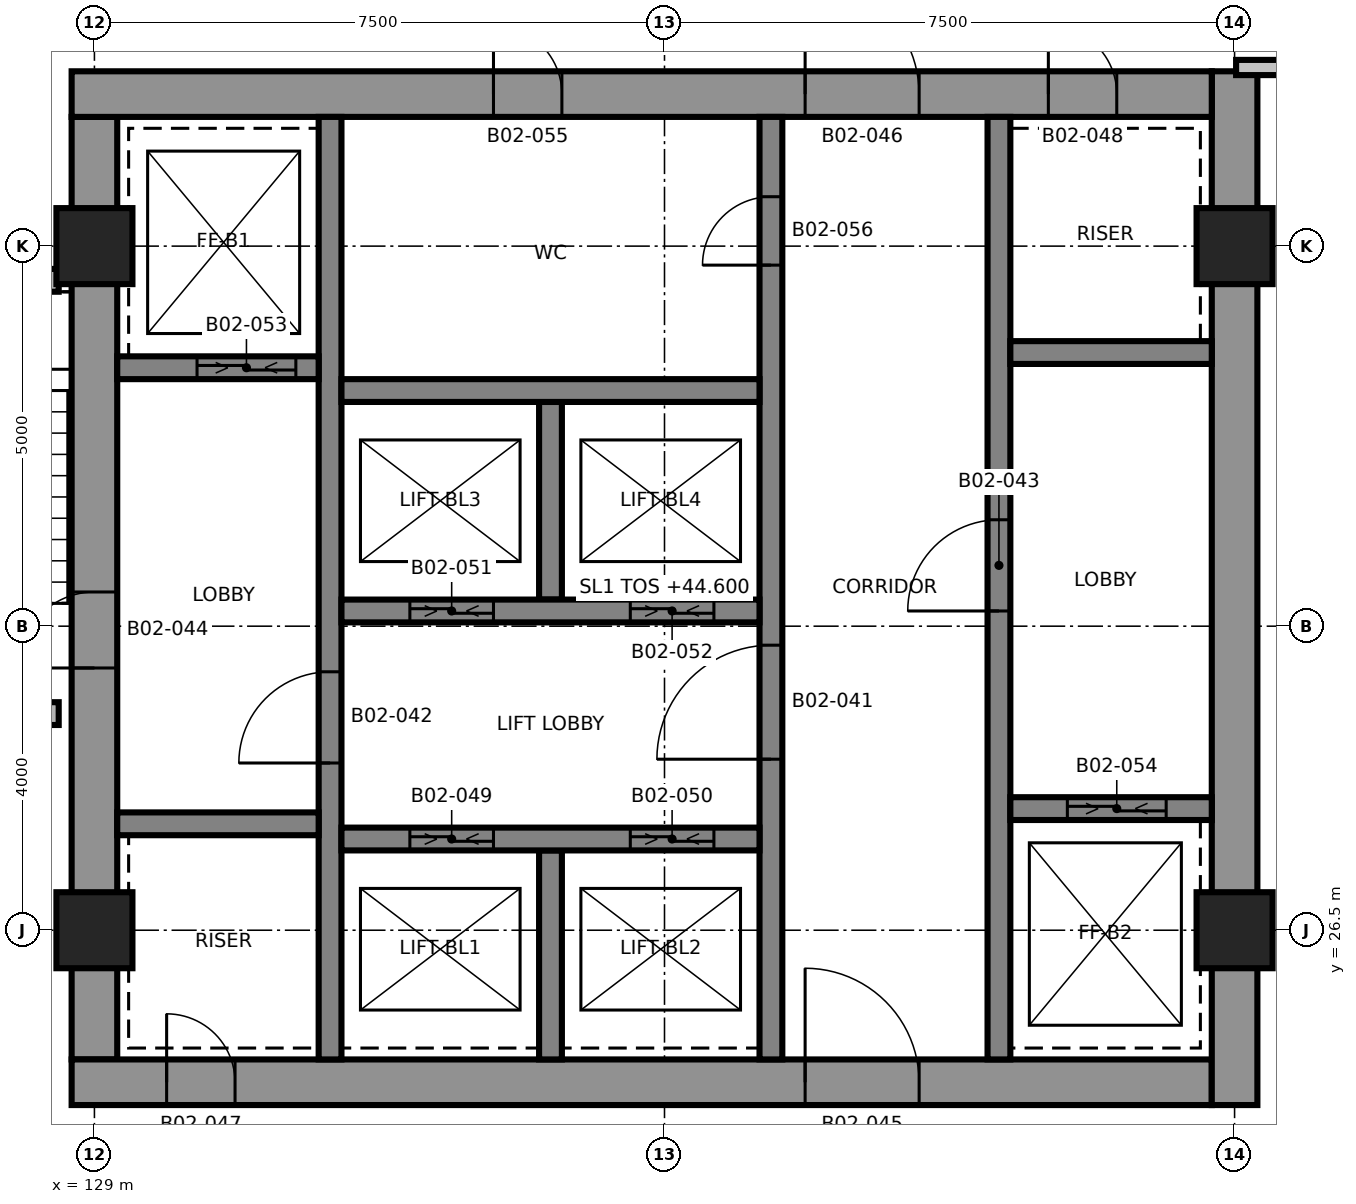
"""IFC4 building model, lengths in metres.
Left out: names, types, materials, properties, quantities, classifications, styles, units other than length and angle.
Written with IfcOpenShell. Run it as: python <this file> out.ifc"""

import sys

from ifc_helpers import new_model, si_unit, direction, frame, frame_2d, origin, origin_2d, place, context, subcontext, project, spatial, rectangle, extrude, element, fill, save


model = new_model("IFC4")
c1 = context("Model", 3, precision=1e-05, world=origin(), true_north=direction((0.0, 1.0)))
c2 = subcontext(c1, "Body", "Model", "MODEL_VIEW")
j1 = project(units=[si_unit("LENGTHUNIT", "METRE"), si_unit("PLANEANGLEUNIT", "RADIAN")], contexts=[c1])
p1 = place(None, origin())
s1 = spatial("IfcSite", under=j1, at=p1, CompositionType="ELEMENT")
p2 = place(p1, origin())
s2 = spatial("IfcBuilding", under=s1, at=p2, CompositionType="ELEMENT")
p3 = place(p2, frame((0.0, 0.0, 44.6)))
s3 = spatial("IfcBuildingStorey", under=s2, at=p3, CompositionType="ELEMENT", Elevation=44.6)
p4 = place(p3, frame((129.0, 24.8, 0.0), z_axis=(0.0, 0.0, 1.0), x_axis=(0.0, 1.0, 0.0)))
e1 = element("IfcWall", 1, at=p4, inside=s3, PredefinedType="SHEAR", context=c2, shape_type="SweptSolid", body=[
    extrude(rectangle(XDim=12.4, YDim=0.6, at=frame_2d((6.2, 0.0))), origin(), (0.0, 0.0, 1.0), 3.7),
])
p5 = place(p4, frame((5.15, 0.0, 0.0)))
e2 = element("IfcOpeningElement", 2, at=p5, cuts=e1, PredefinedType="OPENING", context=c2, shape_type="SweptSolid", body=[
    extrude(rectangle(XDim=1.0, YDim=2.1, at=frame_2d((0.5, 1.05))), frame((0.0, 0.31, 0.0), z_axis=(0.0, -1.0, 0.0), x_axis=(1.0, 0.0, 0.0)), (0.0, 0.0, 1.0), 0.62),
])
p6 = place(p3, frame((128.7, 24.5, 0.0), z_axis=(0.0, 0.0, 1.0), x_axis=(1.0, 0.0, 0.0)))
e3 = element("IfcWall", 3, at=p6, inside=s3, PredefinedType="SHEAR", context=c2, shape_type="SweptSolid", body=[
    extrude(rectangle(XDim=15.0, YDim=0.6, at=frame_2d((7.5, 0.0))), origin(), (0.0, 0.0, 1.0), 3.7),
])
p7 = place(p6, frame((9.65, 0.0, 0.0)))
e4 = element("IfcOpeningElement", 4, at=p7, cuts=e3, PredefinedType="OPENING", context=c2, shape_type="SweptSolid", body=[
    extrude(rectangle(XDim=1.5, YDim=2.1, at=frame_2d((0.75, 1.05))), frame((0.0, 0.31, 0.0), z_axis=(0.0, -1.0, 0.0), x_axis=(1.0, 0.0, 0.0)), (0.0, 0.0, 1.0), 0.62),
])
p8 = place(p6, frame((1.25, 0.0, 0.0)))
e5 = element("IfcOpeningElement", 5, at=p8, cuts=e3, PredefinedType="OPENING", context=c2, shape_type="SweptSolid", body=[
    extrude(rectangle(XDim=0.9, YDim=2.1, at=frame_2d((0.45, 1.05))), frame((0.0, 0.31, 0.0), z_axis=(0.0, -1.0, 0.0), x_axis=(1.0, 0.0, 0.0)), (0.0, 0.0, 1.0), 0.62),
])
p9 = place(p3, frame((144.0, 24.2, 0.0), z_axis=(0.0, 0.0, 1.0), x_axis=(0.0, 1.0, 0.0)))
e6 = element("IfcWall", 6, at=p9, inside=s3, PredefinedType="SHEAR", context=c2, shape_type="SweptSolid", body=[
    extrude(rectangle(XDim=13.6, YDim=0.6, at=frame_2d((6.8, 0.0))), origin(), (0.0, 0.0, 1.0), 3.7),
])
p10 = place(p3, frame((128.7, 37.5, 0.0), z_axis=(0.0, 0.0, 1.0), x_axis=(1.0, 0.0, 0.0)))
e7 = element("IfcWall", 7, at=p10, inside=s3, PredefinedType="SHEAR", context=c2, shape_type="SweptSolid", body=[
    extrude(rectangle(XDim=15.0, YDim=0.6, at=frame_2d((7.5, 0.0))), origin(), (0.0, 0.0, 1.0), 3.7),
])
p11 = place(p10, frame((9.65, 0.0, 0.0)))
e8 = element("IfcOpeningElement", 8, at=p11, cuts=e7, PredefinedType="OPENING", context=c2, shape_type="SweptSolid", body=[
    extrude(rectangle(XDim=1.5, YDim=2.1, at=frame_2d((0.75, 1.05))), frame((0.0, 0.31, 0.0), z_axis=(0.0, -1.0, 0.0), x_axis=(1.0, 0.0, 0.0)), (0.0, 0.0, 1.0), 0.62),
])
p12 = place(p10, frame((12.85, 0.0, 0.0)))
e9 = element("IfcOpeningElement", 9, at=p12, cuts=e7, PredefinedType="OPENING", context=c2, shape_type="SweptSolid", body=[
    extrude(rectangle(XDim=0.9, YDim=2.1, at=frame_2d((0.45, 1.05))), frame((0.0, 0.31, 0.0), z_axis=(0.0, -1.0, 0.0), x_axis=(1.0, 0.0, 0.0)), (0.0, 0.0, 1.0), 0.62),
])
p13 = place(p10, frame((5.55, 0.0, 0.0)))
e10 = element("IfcOpeningElement", 10, at=p13, cuts=e7, PredefinedType="OPENING", context=c2, shape_type="SweptSolid", body=[
    extrude(rectangle(XDim=0.9, YDim=2.1, at=frame_2d((0.45, 1.05))), frame((0.0, 0.31, 0.0), z_axis=(0.0, -1.0, 0.0), x_axis=(1.0, 0.0, 0.0)), (0.0, 0.0, 1.0), 0.62),
])
p14 = place(p3, frame((132.1, 24.8, 0.0), z_axis=(0.0, 0.0, 1.0), x_axis=(0.0, 1.0, 0.0)))
e11 = element("IfcWall", 11, at=p14, inside=s3, PredefinedType="SHEAR", context=c2, shape_type="SweptSolid", body=[
    extrude(rectangle(XDim=12.4, YDim=0.3, at=frame_2d((6.2, 0.0))), origin(), (0.0, 0.0, 1.0), 3.7),
])
p15 = place(p14, frame((3.9, 0.0, 0.0)))
e12 = element("IfcOpeningElement", 12, at=p15, cuts=e11, PredefinedType="OPENING", context=c2, shape_type="SweptSolid", body=[
    extrude(rectangle(XDim=1.2, YDim=2.1, at=frame_2d((0.6, 1.05))), frame((0.0, 0.16, 0.0), z_axis=(0.0, -1.0, 0.0), x_axis=(1.0, 0.0, 0.0)), (0.0, 0.0, 1.0), 0.32),
])
p16 = place(p3, frame((137.9, 24.8, 0.0), z_axis=(0.0, 0.0, 1.0), x_axis=(0.0, 1.0, 0.0)))
e13 = element("IfcWall", 13, at=p16, inside=s3, PredefinedType="SHEAR", context=c2, shape_type="SweptSolid", body=[
    extrude(rectangle(XDim=12.4, YDim=0.3, at=frame_2d((6.2, 0.0))), origin(), (0.0, 0.0, 1.0), 3.7),
])
p17 = place(p16, frame((3.95, 0.0, 0.0)))
e14 = element("IfcOpeningElement", 14, at=p17, cuts=e13, PredefinedType="OPENING", context=c2, shape_type="SweptSolid", body=[
    extrude(rectangle(XDim=1.5, YDim=2.1, at=frame_2d((0.75, 1.05))), frame((0.0, 0.16, 0.0), z_axis=(0.0, -1.0, 0.0), x_axis=(1.0, 0.0, 0.0)), (0.0, 0.0, 1.0), 0.32),
])
p18 = place(p16, frame((10.45, 0.0, 0.0)))
e15 = element("IfcOpeningElement", 15, at=p18, cuts=e13, PredefinedType="OPENING", context=c2, shape_type="SweptSolid", body=[
    extrude(rectangle(XDim=0.9, YDim=2.1, at=frame_2d((0.45, 1.05))), frame((0.0, 0.16, 0.0), z_axis=(0.0, -1.0, 0.0), x_axis=(1.0, 0.0, 0.0)), (0.0, 0.0, 1.0), 0.32),
])
p19 = place(p3, frame((140.9, 24.8, 0.0), z_axis=(0.0, 0.0, 1.0), x_axis=(0.0, 1.0, 0.0)))
e16 = element("IfcWall", 16, at=p19, inside=s3, PredefinedType="SHEAR", context=c2, shape_type="SweptSolid", body=[
    extrude(rectangle(XDim=12.4, YDim=0.3, at=frame_2d((6.2, 0.0))), origin(), (0.0, 0.0, 1.0), 3.7),
])
p20 = place(p19, frame((5.9, 0.0, 0.0)))
e17 = element("IfcOpeningElement", 17, at=p20, cuts=e16, PredefinedType="OPENING", context=c2, shape_type="SweptSolid", body=[
    extrude(rectangle(XDim=1.2, YDim=2.1, at=frame_2d((0.6, 1.05))), frame((0.0, 0.16, 0.0), z_axis=(0.0, -1.0, 0.0), x_axis=(1.0, 0.0, 0.0)), (0.0, 0.0, 1.0), 0.32),
])
p21 = place(p3, frame((135.0, 24.8, 0.0), z_axis=(0.0, 0.0, 1.0), x_axis=(0.0, 1.0, 0.0)))
e18 = element("IfcWall", 18, at=p21, inside=s3, PredefinedType="SHEAR", context=c2, shape_type="SweptSolid", body=[
    extrude(rectangle(XDim=2.75, YDim=0.3, at=frame_2d((1.375, 0.0))), origin(), (0.0, 0.0, 1.0), 3.7),
])
p22 = place(p3, frame((135.0, 30.85, 0.0), z_axis=(0.0, 0.0, 1.0), x_axis=(0.0, 1.0, 0.0)))
e19 = element("IfcWall", 19, at=p22, inside=s3, PredefinedType="SHEAR", context=c2, shape_type="SweptSolid", body=[
    extrude(rectangle(XDim=2.6, YDim=0.3, at=frame_2d((1.3, 0.0))), origin(), (0.0, 0.0, 1.0), 3.7),
])
p23 = place(p3, frame((132.25, 27.7, 0.0), z_axis=(0.0, 0.0, 1.0), x_axis=(1.0, 0.0, 0.0)))
e20 = element("IfcWall", 20, at=p23, inside=s3, PredefinedType="SHEAR", context=c2, shape_type="SweptSolid", body=[
    extrude(rectangle(XDim=5.5, YDim=0.3, at=frame_2d((2.75, 0.0))), origin(), (0.0, 0.0, 1.0), 3.7),
])
p24 = place(p23, frame((0.9, 0.0, 0.0)))
e21 = element("IfcOpeningElement", 21, at=p24, cuts=e20, PredefinedType="OPENING", context=c2, shape_type="SweptSolid", body=[
    extrude(rectangle(XDim=1.1, YDim=2.4, at=frame_2d((0.55, 1.2))), frame((0.0, 0.16, 0.0), z_axis=(0.0, -1.0, 0.0), x_axis=(1.0, 0.0, 0.0)), (0.0, 0.0, 1.0), 0.32),
])
p25 = place(p23, frame((3.8, 0.0, 0.0)))
e22 = element("IfcOpeningElement", 22, at=p25, cuts=e20, PredefinedType="OPENING", context=c2, shape_type="SweptSolid", body=[
    extrude(rectangle(XDim=1.1, YDim=2.4, at=frame_2d((0.55, 1.2))), frame((0.0, 0.16, 0.0), z_axis=(0.0, -1.0, 0.0), x_axis=(1.0, 0.0, 0.0)), (0.0, 0.0, 1.0), 0.32),
])
p26 = place(p3, frame((132.25, 30.7, 0.0), z_axis=(0.0, 0.0, 1.0), x_axis=(1.0, 0.0, 0.0)))
e23 = element("IfcWall", 23, at=p26, inside=s3, PredefinedType="SHEAR", context=c2, shape_type="SweptSolid", body=[
    extrude(rectangle(XDim=5.5, YDim=0.3, at=frame_2d((2.75, 0.0))), origin(), (0.0, 0.0, 1.0), 3.7),
])
p27 = place(p26, frame((0.9, 0.0, 0.0)))
e24 = element("IfcOpeningElement", 24, at=p27, cuts=e23, PredefinedType="OPENING", context=c2, shape_type="SweptSolid", body=[
    extrude(rectangle(XDim=1.1, YDim=2.4, at=frame_2d((0.55, 1.2))), frame((0.0, 0.16, 0.0), z_axis=(0.0, -1.0, 0.0), x_axis=(1.0, 0.0, 0.0)), (0.0, 0.0, 1.0), 0.32),
])
p28 = place(p26, frame((3.8, 0.0, 0.0)))
e25 = element("IfcOpeningElement", 25, at=p28, cuts=e23, PredefinedType="OPENING", context=c2, shape_type="SweptSolid", body=[
    extrude(rectangle(XDim=1.1, YDim=2.4, at=frame_2d((0.55, 1.2))), frame((0.0, 0.16, 0.0), z_axis=(0.0, -1.0, 0.0), x_axis=(1.0, 0.0, 0.0)), (0.0, 0.0, 1.0), 0.32),
])
p29 = place(p3, frame((132.25, 33.6, 0.0), z_axis=(0.0, 0.0, 1.0), x_axis=(1.0, 0.0, 0.0)))
e26 = element("IfcWall", 26, at=p29, inside=s3, PredefinedType="SHEAR", context=c2, shape_type="SweptSolid", body=[
    extrude(rectangle(XDim=5.5, YDim=0.3, at=frame_2d((2.75, 0.0))), origin(), (0.0, 0.0, 1.0), 3.7),
])
p30 = place(p3, frame((129.3, 27.9, 0.0), z_axis=(0.0, 0.0, 1.0), x_axis=(1.0, 0.0, 0.0)))
e27 = element("IfcWall", 27, at=p30, inside=s3, PredefinedType="SHEAR", context=c2, shape_type="SweptSolid", body=[
    extrude(rectangle(XDim=2.65, YDim=0.3, at=frame_2d((1.325, 0.0))), origin(), (0.0, 0.0, 1.0), 3.7),
])
p31 = place(p3, frame((129.3, 33.9, 0.0), z_axis=(0.0, 0.0, 1.0), x_axis=(1.0, 0.0, 0.0)))
e28 = element("IfcWall", 28, at=p31, inside=s3, PredefinedType="SHEAR", context=c2, shape_type="SweptSolid", body=[
    extrude(rectangle(XDim=2.65, YDim=0.3, at=frame_2d((1.325, 0.0))), origin(), (0.0, 0.0, 1.0), 3.7),
])
p32 = place(p31, frame((1.05, 0.0, 0.0)))
e29 = element("IfcOpeningElement", 29, at=p32, cuts=e28, PredefinedType="OPENING", context=c2, shape_type="SweptSolid", body=[
    extrude(rectangle(XDim=1.3, YDim=2.4, at=frame_2d((0.65, 1.2))), frame((0.0, 0.16, 0.0), z_axis=(0.0, -1.0, 0.0), x_axis=(1.0, 0.0, 0.0)), (0.0, 0.0, 1.0), 0.32),
])
p33 = place(p3, frame((141.05, 28.1, 0.0), z_axis=(0.0, 0.0, 1.0), x_axis=(1.0, 0.0, 0.0)))
e30 = element("IfcWall", 30, at=p33, inside=s3, PredefinedType="SHEAR", context=c2, shape_type="SweptSolid", body=[
    extrude(rectangle(XDim=2.65, YDim=0.3, at=frame_2d((1.325, 0.0))), origin(), (0.0, 0.0, 1.0), 3.7),
])
p34 = place(p33, frame((0.75, 0.0, 0.0)))
e31 = element("IfcOpeningElement", 31, at=p34, cuts=e30, PredefinedType="OPENING", context=c2, shape_type="SweptSolid", body=[
    extrude(rectangle(XDim=1.3, YDim=2.4, at=frame_2d((0.65, 1.2))), frame((0.0, 0.16, 0.0), z_axis=(0.0, -1.0, 0.0), x_axis=(1.0, 0.0, 0.0)), (0.0, 0.0, 1.0), 0.32),
])
p35 = place(p3, frame((141.05, 34.1, 0.0), z_axis=(0.0, 0.0, 1.0), x_axis=(1.0, 0.0, 0.0)))
e32 = element("IfcWall", 32, at=p35, inside=s3, PredefinedType="SHEAR", context=c2, shape_type="SweptSolid", body=[
    extrude(rectangle(XDim=2.65, YDim=0.3, at=frame_2d((1.325, 0.0))), origin(), (0.0, 0.0, 1.0), 3.7),
])
for number, where, z_axis, x_axis in (
    (33, (129.0, 26.5, 0.0), (0.0, 0.0, 1.0), (1.0, 0.0, 0.0)),
    (34, (144.0, 26.5, 0.0), (0.0, 0.0, 1.0), (1.0, 0.0, 0.0)),
    (35, (129.0, 35.5, 0.0), (0.0, 0.0, 1.0), (1.0, 0.0, 0.0)),
    (36, (144.0, 35.5, 0.0), (0.0, 0.0, 1.0), (1.0, 0.0, 0.0)),
):
    element("IfcColumn", number, at=place(p3, frame(where, z_axis=z_axis, x_axis=x_axis)), inside=s3, PredefinedType="COLUMN", context=c2, shape_type="SweptSolid", body=[
        extrude(rectangle(XDim=1.0, YDim=1.0, at=origin_2d()), origin(), (0.0, 0.0, 1.0), 3.7),
    ])
p36 = place(p3, frame((125.7, 29.35, 0.0), z_axis=(0.0, 0.0, 1.0), x_axis=(1.0, 0.0, 0.0)))
e37 = element("IfcWall", 37, at=p36, inside=s3, PredefinedType="SHEAR", context=c2, shape_type="SweptSolid", body=[
    extrude(rectangle(XDim=2.83, YDim=0.3, at=frame_2d((1.415, 0.0))), origin(), (0.0, 0.0, 1.0), 3.4),
])
p37 = place(p36, frame((0.975, 0.0, 0.0)))
e38 = element("IfcOpeningElement", 38, at=p37, cuts=e37, PredefinedType="OPENING", context=c2, shape_type="SweptSolid", body=[
    extrude(rectangle(XDim=1.2, YDim=2.1, at=frame_2d((0.6, 1.05))), frame((0.0, 0.16, 0.0), z_axis=(0.0, -1.0, 0.0), x_axis=(1.0, 0.0, 0.0)), (0.0, 0.0, 1.0), 0.32),
])
p38 = place(p3, frame((125.7, 35.05, 0.0), z_axis=(0.0, 0.0, 1.0), x_axis=(1.0, 0.0, 0.0)))
e39 = element("IfcWall", 39, at=p38, inside=s3, PredefinedType="SHEAR", context=c2, shape_type="SweptSolid", body=[
    extrude(rectangle(XDim=2.83, YDim=0.3, at=frame_2d((1.415, 0.0))), origin(), (0.0, 0.0, 1.0), 3.4),
])
p39 = place(p3, frame((144.02, 37.85, 0.0), z_axis=(0.0, 0.0, 1.0), x_axis=(1.0, 0.0, 0.0)))
e40 = element("IfcWall", 40, at=p39, inside=s3, PredefinedType="PARTITIONING", context=c2, shape_type="SweptSolid", body=[
    extrude(rectangle(XDim=3.23, YDim=0.2, at=frame_2d((1.615, 0.0))), origin(), (0.0, 0.0, 1.0), 3.4),
])
p40 = place(p39, frame((1.03, 0.0, 0.0)))
e41 = element("IfcOpeningElement", 41, at=p40, cuts=e40, PredefinedType="OPENING", context=c2, shape_type="SweptSolid", body=[
    extrude(rectangle(XDim=1.5, YDim=2.1, at=frame_2d((0.75, 1.05))), frame((0.0, 0.11, 0.0), z_axis=(0.0, -1.0, 0.0), x_axis=(1.0, 0.0, 0.0)), (0.0, 0.0, 1.0), 0.22),
])
p41 = place(p17, origin())
e42 = element("IfcDoor", 42, at=p41, inside=s3, OperationType="SINGLE_SWING_RIGHT", PredefinedType="DOOR", context=c2, shape_type="SweptSolid", body=[
    extrude(rectangle(XDim=1.5, YDim=2.1, at=frame_2d((0.75, 1.05))), frame((0.0, 0.025, 0.0), z_axis=(0.0, -1.0, 0.0), x_axis=(1.0, 0.0, 0.0)), (0.0, 0.0, 1.0), 0.05),
])
fill(e14, e42)
p42 = place(p15, origin())
e43 = element("IfcDoor", 43, at=p42, inside=s3, OperationType="SINGLE_SWING_LEFT", PredefinedType="DOOR", context=c2, shape_type="SweptSolid", body=[
    extrude(rectangle(XDim=1.2, YDim=2.1, at=frame_2d((0.6, 1.05))), frame((0.0, 0.025, 0.0), z_axis=(0.0, -1.0, 0.0), x_axis=(1.0, 0.0, 0.0)), (0.0, 0.0, 1.0), 0.05),
])
fill(e12, e43)
p43 = place(p20, origin())
e44 = element("IfcDoor", 44, at=p43, inside=s3, OperationType="SINGLE_SWING_RIGHT", PredefinedType="DOOR", context=c2, shape_type="SweptSolid", body=[
    extrude(rectangle(XDim=1.2, YDim=2.1, at=frame_2d((0.6, 1.05))), frame((0.0, 0.025, 0.0), z_axis=(0.0, -1.0, 0.0), x_axis=(1.0, 0.0, 0.0)), (0.0, 0.0, 1.0), 0.05),
])
fill(e17, e44)
p44 = place(p5, origin())
e45 = element("IfcDoor", 45, at=p44, inside=s3, OperationType="SINGLE_SWING_RIGHT", PredefinedType="DOOR", context=c2, shape_type="SweptSolid", body=[
    extrude(rectangle(XDim=1.0, YDim=2.1, at=frame_2d((0.5, 1.05))), frame((0.0, 0.025, 0.0), z_axis=(0.0, -1.0, 0.0), x_axis=(1.0, 0.0, 0.0)), (0.0, 0.0, 1.0), 0.05),
])
fill(e2, e45)
p45 = place(p7, origin())
e46 = element("IfcDoor", 46, at=p45, inside=s3, OperationType="SINGLE_SWING_LEFT", PredefinedType="DOOR", context=c2, shape_type="SweptSolid", body=[
    extrude(rectangle(XDim=1.5, YDim=2.1, at=frame_2d((0.75, 1.05))), frame((0.0, 0.025, 0.0), z_axis=(0.0, -1.0, 0.0), x_axis=(1.0, 0.0, 0.0)), (0.0, 0.0, 1.0), 0.05),
])
fill(e4, e46)
p46 = place(p11, origin())
e47 = element("IfcDoor", 47, at=p46, inside=s3, OperationType="SINGLE_SWING_RIGHT", PredefinedType="DOOR", context=c2, shape_type="SweptSolid", body=[
    extrude(rectangle(XDim=1.5, YDim=2.1, at=frame_2d((0.75, 1.05))), frame((0.0, 0.025, 0.0), z_axis=(0.0, -1.0, 0.0), x_axis=(1.0, 0.0, 0.0)), (0.0, 0.0, 1.0), 0.05),
])
fill(e8, e47)
p47 = place(p8, origin())
e48 = element("IfcDoor", 48, at=p47, inside=s3, OperationType="SINGLE_SWING_LEFT", PredefinedType="DOOR", context=c2, shape_type="SweptSolid", body=[
    extrude(rectangle(XDim=0.9, YDim=2.1, at=frame_2d((0.45, 1.05))), frame((0.0, 0.025, 0.0), z_axis=(0.0, -1.0, 0.0), x_axis=(1.0, 0.0, 0.0)), (0.0, 0.0, 1.0), 0.05),
])
fill(e5, e48)
p48 = place(p12, origin())
e49 = element("IfcDoor", 49, at=p48, inside=s3, OperationType="SINGLE_SWING_RIGHT", PredefinedType="DOOR", context=c2, shape_type="SweptSolid", body=[
    extrude(rectangle(XDim=0.9, YDim=2.1, at=frame_2d((0.45, 1.05))), frame((0.0, 0.025, 0.0), z_axis=(0.0, -1.0, 0.0), x_axis=(1.0, 0.0, 0.0)), (0.0, 0.0, 1.0), 0.05),
])
fill(e9, e49)
p49 = place(p24, origin())
e50 = element("IfcDoor", 50, at=p49, inside=s3, OperationType="SLIDING_TO_LEFT", PredefinedType="DOOR", context=c2, shape_type="SweptSolid", body=[
    extrude(rectangle(XDim=1.1, YDim=2.4, at=frame_2d((0.55, 1.2))), frame((0.0, 0.025, 0.0), z_axis=(0.0, -1.0, 0.0), x_axis=(1.0, 0.0, 0.0)), (0.0, 0.0, 1.0), 0.05),
])
fill(e21, e50)
p50 = place(p25, origin())
e51 = element("IfcDoor", 51, at=p50, inside=s3, OperationType="SLIDING_TO_LEFT", PredefinedType="DOOR", context=c2, shape_type="SweptSolid", body=[
    extrude(rectangle(XDim=1.1, YDim=2.4, at=frame_2d((0.55, 1.2))), frame((0.0, 0.025, 0.0), z_axis=(0.0, -1.0, 0.0), x_axis=(1.0, 0.0, 0.0)), (0.0, 0.0, 1.0), 0.05),
])
fill(e22, e51)
p51 = place(p27, origin())
e52 = element("IfcDoor", 52, at=p51, inside=s3, OperationType="SLIDING_TO_LEFT", PredefinedType="DOOR", context=c2, shape_type="SweptSolid", body=[
    extrude(rectangle(XDim=1.1, YDim=2.4, at=frame_2d((0.55, 1.2))), frame((0.0, 0.025, 0.0), z_axis=(0.0, -1.0, 0.0), x_axis=(1.0, 0.0, 0.0)), (0.0, 0.0, 1.0), 0.05),
])
fill(e24, e52)
p52 = place(p28, origin())
e53 = element("IfcDoor", 53, at=p52, inside=s3, OperationType="SLIDING_TO_LEFT", PredefinedType="DOOR", context=c2, shape_type="SweptSolid", body=[
    extrude(rectangle(XDim=1.1, YDim=2.4, at=frame_2d((0.55, 1.2))), frame((0.0, 0.025, 0.0), z_axis=(0.0, -1.0, 0.0), x_axis=(1.0, 0.0, 0.0)), (0.0, 0.0, 1.0), 0.05),
])
fill(e25, e53)
p53 = place(p32, origin())
e54 = element("IfcDoor", 54, at=p53, inside=s3, OperationType="SLIDING_TO_LEFT", PredefinedType="DOOR", context=c2, shape_type="SweptSolid", body=[
    extrude(rectangle(XDim=1.3, YDim=2.4, at=frame_2d((0.65, 1.2))), frame((0.0, 0.025, 0.0), z_axis=(0.0, -1.0, 0.0), x_axis=(1.0, 0.0, 0.0)), (0.0, 0.0, 1.0), 0.05),
])
fill(e29, e54)
p54 = place(p34, origin())
e55 = element("IfcDoor", 55, at=p54, inside=s3, OperationType="SLIDING_TO_LEFT", PredefinedType="DOOR", context=c2, shape_type="SweptSolid", body=[
    extrude(rectangle(XDim=1.3, YDim=2.4, at=frame_2d((0.65, 1.2))), frame((0.0, 0.025, 0.0), z_axis=(0.0, -1.0, 0.0), x_axis=(1.0, 0.0, 0.0)), (0.0, 0.0, 1.0), 0.05),
])
fill(e31, e55)
p55 = place(p13, origin())
e56 = element("IfcDoor", 56, at=p55, inside=s3, OperationType="SINGLE_SWING_LEFT", PredefinedType="DOOR", context=c2, shape_type="SweptSolid", body=[
    extrude(rectangle(XDim=0.9, YDim=2.1, at=frame_2d((0.45, 1.05))), frame((0.0, 0.025, 0.0), z_axis=(0.0, -1.0, 0.0), x_axis=(1.0, 0.0, 0.0)), (0.0, 0.0, 1.0), 0.05),
])
fill(e10, e56)
p56 = place(p18, origin())
e57 = element("IfcDoor", 57, at=p56, inside=s3, OperationType="SINGLE_SWING_RIGHT", PredefinedType="DOOR", context=c2, shape_type="SweptSolid", body=[
    extrude(rectangle(XDim=0.9, YDim=2.1, at=frame_2d((0.45, 1.05))), frame((0.0, 0.025, 0.0), z_axis=(0.0, -1.0, 0.0), x_axis=(1.0, 0.0, 0.0)), (0.0, 0.0, 1.0), 0.05),
])
fill(e15, e57)
save(model, sys.argv[1])
